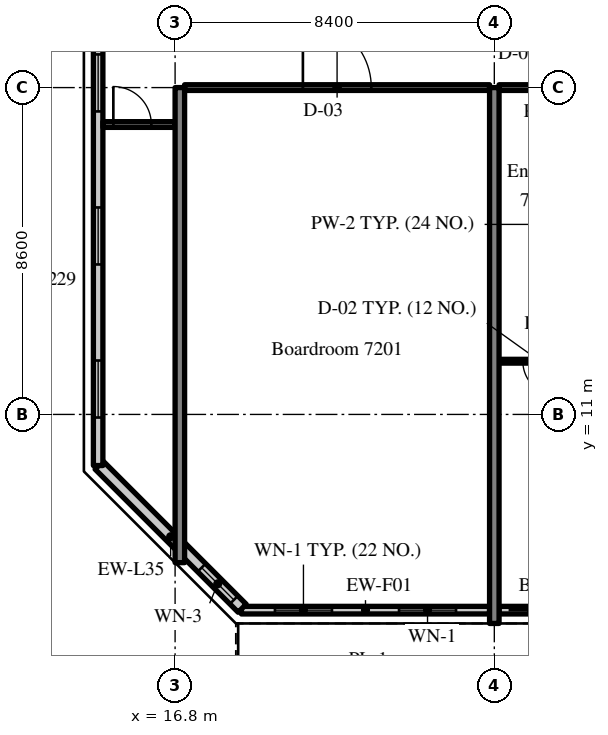
"""IFC4 building model, lengths in metres.
Left out: names, types, materials, properties, quantities, classifications, styles, units other than length and angle.
Written with IfcOpenShell. Run it as: python <this file> out.ifc"""

import sys

from ifc_helpers import new_model, si_unit, direction, frame, frame_2d, origin, place, context, subcontext, project, spatial, rectangle, extrude, source, transform, mapped, element, fill, save


model = new_model("IFC4")
c1 = context("Model", 3, precision=1e-05, world=origin(), true_north=direction((0.0, 1.0)))
c2 = subcontext(c1, "Body", "Model", "MODEL_VIEW")
j1 = project(units=[si_unit("LENGTHUNIT", "METRE"), si_unit("PLANEANGLEUNIT", "RADIAN")], contexts=[c1])
p1 = place(None, origin())
s1 = spatial("IfcSite", under=j1, at=p1, CompositionType="ELEMENT")
p2 = place(p1, origin())
s2 = spatial("IfcBuilding", under=s1, at=p2, CompositionType="ELEMENT")
p3 = place(p2, frame((0.0, 0.0, 301.7)))
s3 = spatial("IfcBuildingStorey", under=s2, at=p3, CompositionType="ELEMENT", Elevation=301.7)
m1 = source(origin(), c2, "Body", "SweptSolid", [
    extrude(rectangle(XDim=12.5, YDim=0.25, at=frame_2d((6.25, 0.0))), origin(), (0.0, 0.0, 1.0), 3.72),
])
p4 = place(p3, frame((16.925, 7.1, 0.0), z_axis=(0.0, 0.0, 1.0), x_axis=(0.0, 1.0, 0.0)))
e1 = element("IfcWall", 1, at=p4, inside=s3, PredefinedType="SHEAR", context=c2, shape_type="MappedRepresentation", body=[
    mapped(m1, transform((0.0, 0.0, 0.0), scale=1.0)),
])
m2 = source(origin(), c2, "Body", "SweptSolid", [
    extrude(rectangle(XDim=14.1, YDim=0.25, at=frame_2d((7.05, 0.0))), origin(), (0.0, 0.0, 1.0), 3.72),
])
p5 = place(p3, frame((25.2, 5.5, 0.0), z_axis=(0.0, 0.0, 1.0), x_axis=(0.0, 1.0, 0.0)))
e2 = element("IfcWall", 2, at=p5, inside=s3, PredefinedType="SHEAR", context=c2, shape_type="MappedRepresentation", body=[
    mapped(m2, transform((0.0, 0.0, 0.0), scale=1.0)),
])
m3 = source(origin(), c2, "Body", "SweptSolid", [
    extrude(rectangle(XDim=6.53, YDim=0.2, at=frame_2d((3.265, 0.0))), origin(), (0.0, 0.0, 1.0), 3.17),
])
p6 = place(p3, frame((18.545, 5.85, 0.0), z_axis=(0.0, 0.0, 1.0), x_axis=(1.0, 0.0, 0.0)))
e3 = element("IfcWall", 3, at=p6, inside=s3, PredefinedType="SOLIDWALL", context=c2, shape_type="MappedRepresentation", body=[
    mapped(m3, transform((0.0, 0.0, 0.0), scale=1.0)),
])
m4 = source(origin(), c2, "Body", "SweptSolid", [
    extrude(rectangle(XDim=1.5, YDim=1.5, at=frame_2d((0.75, 0.75))), frame((0.0, 0.11, 0.0), z_axis=(0.0, -1.0, 0.0), x_axis=(1.0, 0.0, 0.0)), (0.0, 0.0, 1.0), 0.22),
])
p7 = place(p6, frame((0.883, 0.0, 0.9)))
e4 = element("IfcOpeningElement", 4, at=p7, cuts=e3, PredefinedType="OPENING", context=c2, shape_type="MappedRepresentation", body=[
    mapped(m4, transform((0.0, 0.0, 0.0), scale=1.0)),
])
p8 = place(p6, frame((4.147, 0.0, 0.9)))
e5 = element("IfcOpeningElement", 5, at=p8, cuts=e3, PredefinedType="OPENING", context=c2, shape_type="MappedRepresentation", body=[
    mapped(m4, transform((0.0, 0.0, 0.0), scale=1.0)),
])
m5 = source(origin(), c2, "Body", "SweptSolid", [
    extrude(rectangle(XDim=8.15, YDim=0.2, at=frame_2d((4.075, 0.0))), origin(), (0.0, 0.0, 1.0), 3.17),
])
p9 = place(p3, frame((25.325, 5.85, 0.0), z_axis=(0.0, 0.0, 1.0), x_axis=(1.0, 0.0, 0.0)))
e6 = element("IfcWall", 6, at=p9, inside=s3, PredefinedType="SOLIDWALL", context=c2, shape_type="MappedRepresentation", body=[
    mapped(m5, transform((0.0, 0.0, 0.0), scale=1.0)),
])
m6 = source(origin(), c2, "Body", "SweptSolid", [
    extrude(rectangle(XDim=1.2, YDim=2.4, at=frame_2d((0.6, 1.2))), frame((0.0, 0.11, 0.0), z_axis=(0.0, -1.0, 0.0), x_axis=(1.0, 0.0, 0.0)), (0.0, 0.0, 1.0), 0.22),
])
p10 = place(p9, frame((0.25, 0.0, 0.0)))
e7 = element("IfcOpeningElement", 7, at=p10, cuts=e6, PredefinedType="OPENING", context=c2, shape_type="MappedRepresentation", body=[
    mapped(m6, transform((0.0, 0.0, 0.0), scale=1.0)),
])
p11 = place(p9, frame((2.325, 0.0, 0.9)))
e8 = element("IfcOpeningElement", 8, at=p11, cuts=e6, PredefinedType="OPENING", context=c2, shape_type="MappedRepresentation", body=[
    mapped(m4, transform((0.0, 0.0, 0.0), scale=1.0)),
])
p12 = place(p9, frame((4.325, 0.0, 0.0)))
e9 = element("IfcOpeningElement", 9, at=p12, cuts=e6, PredefinedType="OPENING", context=c2, shape_type="MappedRepresentation", body=[
    mapped(m6, transform((0.0, 0.0, 0.0), scale=1.0)),
])
p13 = place(p9, frame((6.4, 0.0, 0.9)))
e10 = element("IfcOpeningElement", 10, at=p13, cuts=e6, PredefinedType="OPENING", context=c2, shape_type="MappedRepresentation", body=[
    mapped(m4, transform((0.0, 0.0, 0.0), scale=1.0)),
])
m7 = source(origin(), c2, "Body", "SweptSolid", [
    extrude(rectangle(XDim=5.326, YDim=0.3, at=frame_2d((2.663, 0.0))), origin(), (0.0, 0.0, 1.0), 3.72),
])
p14 = place(p3, frame((14.8, 9.666, 0.0), z_axis=(0.0, 0.0, 1.0), x_axis=(0.707083859269, -0.707129702361, 0.0)))
e11 = element("IfcWall", 11, at=p14, inside=s3, PredefinedType="SOLIDWALL", context=c2, shape_type="MappedRepresentation", body=[
    mapped(m7, transform((0.0, 0.0, 0.0), scale=1.0)),
])
m8 = source(origin(), c2, "Body", "SweptSolid", [
    extrude(rectangle(XDim=1.2, YDim=1.5, at=frame_2d((0.6, 0.75))), frame((0.0, 0.16, 0.0), z_axis=(0.0, -1.0, 0.0), x_axis=(1.0, 0.0, 0.0)), (0.0, 0.0, 1.0), 0.32),
])
p15 = place(p14, frame((3.815, 0.0, 0.9)))
e12 = element("IfcOpeningElement", 12, at=p15, cuts=e11, PredefinedType="OPENING", context=c2, shape_type="MappedRepresentation", body=[
    mapped(m8, transform((0.0, 0.0, 0.0), scale=1.0)),
])
m9 = source(origin(), c2, "Body", "SweptSolid", [
    extrude(rectangle(XDim=28.189, YDim=0.25, at=frame_2d((14.095, 0.0))), origin(), (0.0, 0.0, 1.0), 3.72),
])
p16 = place(p3, frame((14.775, 37.845, 0.0), z_axis=(0.0, 0.0, 1.0), x_axis=(0.0, -1.0, 0.0)))
e13 = element("IfcWall", 13, at=p16, inside=s3, PredefinedType="SOLIDWALL", context=c2, shape_type="MappedRepresentation", body=[
    mapped(m9, transform((0.0, 0.0, 0.0), scale=1.0)),
])
m10 = source(origin(), c2, "Body", "SweptSolid", [
    extrude(rectangle(XDim=1.5, YDim=1.5, at=frame_2d((0.75, 0.75))), frame((0.0, 0.135, 0.0), z_axis=(0.0, -1.0, 0.0), x_axis=(1.0, 0.0, 0.0)), (0.0, 0.0, 1.0), 0.27),
])
p17 = place(p16, frame((1.263, 0.0, 0.9)))
e14 = element("IfcOpeningElement", 14, at=p17, cuts=e13, PredefinedType="OPENING", context=c2, shape_type="MappedRepresentation", body=[
    mapped(m10, transform((0.0, 0.0, 0.0), scale=1.0)),
])
p18 = place(p16, frame((5.291, 0.0, 0.9)))
e15 = element("IfcOpeningElement", 15, at=p18, cuts=e13, PredefinedType="OPENING", context=c2, shape_type="MappedRepresentation", body=[
    mapped(m10, transform((0.0, 0.0, 0.0), scale=1.0)),
])
p19 = place(p16, frame((9.318, 0.0, 0.9)))
e16 = element("IfcOpeningElement", 16, at=p19, cuts=e13, PredefinedType="OPENING", context=c2, shape_type="MappedRepresentation", body=[
    mapped(m10, transform((0.0, 0.0, 0.0), scale=1.0)),
])
p20 = place(p16, frame((13.345, 0.0, 0.9)))
e17 = element("IfcOpeningElement", 17, at=p20, cuts=e13, PredefinedType="OPENING", context=c2, shape_type="MappedRepresentation", body=[
    mapped(m10, transform((0.0, 0.0, 0.0), scale=1.0)),
])
p21 = place(p16, frame((17.372, 0.0, 0.9)))
e18 = element("IfcOpeningElement", 18, at=p21, cuts=e13, PredefinedType="OPENING", context=c2, shape_type="MappedRepresentation", body=[
    mapped(m10, transform((0.0, 0.0, 0.0), scale=1.0)),
])
p22 = place(p16, frame((21.399, 0.0, 0.9)))
e19 = element("IfcOpeningElement", 19, at=p22, cuts=e13, PredefinedType="OPENING", context=c2, shape_type="MappedRepresentation", body=[
    mapped(m10, transform((0.0, 0.0, 0.0), scale=1.0)),
])
p23 = place(p16, frame((25.426, 0.0, 0.9)))
e20 = element("IfcOpeningElement", 20, at=p23, cuts=e13, PredefinedType="OPENING", context=c2, shape_type="MappedRepresentation", body=[
    mapped(m10, transform((0.0, 0.0, 0.0), scale=1.0)),
])
m11 = source(origin(), c2, "Body", "SweptSolid", [
    extrude(rectangle(XDim=8.025, YDim=0.15, at=frame_2d((4.012, 0.0))), origin(), (0.0, 0.0, 1.0), 3.02),
])
p24 = place(p3, frame((17.05, 19.6, 0.0), z_axis=(0.0, 0.0, 1.0), x_axis=(1.0, 0.0, 0.0)))
e21 = element("IfcWall", 21, at=p24, inside=s3, PredefinedType="PARTITIONING", context=c2, shape_type="MappedRepresentation", body=[
    mapped(m11, transform((0.0, 0.0, 0.0), scale=1.0)),
])
m12 = source(origin(), c2, "Body", "SweptSolid", [
    extrude(rectangle(XDim=1.8, YDim=2.1, at=frame_2d((0.9, 1.05))), frame((0.0, 0.085, 0.0), z_axis=(0.0, -1.0, 0.0), x_axis=(1.0, 0.0, 0.0)), (0.0, 0.0, 1.0), 0.17),
])
p25 = place(p24, frame((3.113, 0.0, 0.0)))
e22 = element("IfcOpeningElement", 22, at=p25, cuts=e21, PredefinedType="OPENING", context=c2, shape_type="MappedRepresentation", body=[
    mapped(m12, transform((0.0, 0.0, 0.0), scale=1.0)),
])
m13 = source(origin(), c2, "Body", "SweptSolid", [
    extrude(rectangle(XDim=2.15, YDim=0.1, at=frame_2d((1.075, 0.0))), origin(), (0.0, 0.0, 1.0), 3.72),
])
p26 = place(p3, frame((25.325, 12.4, 0.0), z_axis=(0.0, 0.0, 1.0), x_axis=(1.0, 0.0, 0.0)))
e23 = element("IfcWall", 23, at=p26, inside=s3, PredefinedType="PARTITIONING", context=c2, shape_type="MappedRepresentation", body=[
    mapped(m13, transform((0.0, 0.0, 0.0), scale=1.0)),
])
m14 = source(origin(), c2, "Body", "SweptSolid", [
    extrude(rectangle(XDim=0.9, YDim=2.1, at=frame_2d((0.45, 1.05))), frame((0.0, 0.06, 0.0), z_axis=(0.0, -1.0, 0.0), x_axis=(1.0, 0.0, 0.0)), (0.0, 0.0, 1.0), 0.12),
])
p27 = place(p26, frame((0.625, 0.0, 0.0)))
e24 = element("IfcOpeningElement", 24, at=p27, cuts=e23, PredefinedType="OPENING", context=c2, shape_type="MappedRepresentation", body=[
    mapped(m14, transform((0.0, 0.0, 0.0), scale=1.0)),
])
m15 = source(origin(), c2, "Body", "SweptSolid", [
    extrude(rectangle(XDim=4.0, YDim=0.15, at=frame_2d((2.0, 0.0))), origin(), (0.0, 0.0, 1.0), 3.02),
])
p28 = place(p3, frame((25.325, 19.6, 0.0), z_axis=(0.0, 0.0, 1.0), x_axis=(1.0, 0.0, 0.0)))
e25 = element("IfcWall", 25, at=p28, inside=s3, PredefinedType="PARTITIONING", context=c2, shape_type="MappedRepresentation", body=[
    mapped(m15, transform((0.0, 0.0, 0.0), scale=1.0)),
])
m16 = source(origin(), c2, "Body", "SweptSolid", [
    extrude(rectangle(XDim=1.0, YDim=2.1, at=frame_2d((0.5, 1.05))), frame((0.0, 0.085, 0.0), z_axis=(0.0, -1.0, 0.0), x_axis=(1.0, 0.0, 0.0)), (0.0, 0.0, 1.0), 0.17),
])
p29 = place(p28, frame((2.6, 0.0, 0.0)))
e26 = element("IfcOpeningElement", 26, at=p29, cuts=e25, PredefinedType="OPENING", context=c2, shape_type="MappedRepresentation", body=[
    mapped(m16, transform((0.0, 0.0, 0.0), scale=1.0)),
])
m17 = source(origin(), c2, "Body", "SweptSolid", [
    extrude(rectangle(XDim=1.9, YDim=0.15, at=frame_2d((0.95, 0.0))), origin(), (0.0, 0.0, 1.0), 3.02),
])
p30 = place(p3, frame((14.9, 18.628, 0.0), z_axis=(0.0, 0.0, 1.0), x_axis=(1.0, 0.0, 0.0)))
e27 = element("IfcWall", 27, at=p30, inside=s3, PredefinedType="PARTITIONING", context=c2, shape_type="MappedRepresentation", body=[
    mapped(m17, transform((0.0, 0.0, 0.0), scale=1.0)),
])
p31 = place(p30, frame((0.275, 0.0, 0.0)))
e28 = element("IfcOpeningElement", 28, at=p31, cuts=e27, PredefinedType="OPENING", context=c2, shape_type="MappedRepresentation", body=[
    mapped(m16, transform((0.0, 0.0, 0.0), scale=1.0)),
])
m18 = source(origin(), c2, "Body", "SweptSolid", [
    extrude(rectangle(XDim=1.5, YDim=1.5, at=frame_2d((0.75, 0.75))), frame((0.0, 0.03, 0.0), z_axis=(0.0, -1.0, 0.0), x_axis=(1.0, 0.0, 0.0)), (0.0, 0.0, 1.0), 0.06),
])
p32 = place(p7, origin())
e29 = element("IfcWindow", 29, at=p32, inside=s3, PartitioningType="SINGLE_PANEL", PredefinedType="WINDOW", context=c2, shape_type="MappedRepresentation", body=[
    mapped(m18, transform((0.0, 0.0, 0.0), scale=1.0)),
])
fill(e4, e29)
p33 = place(p8, origin())
e30 = element("IfcWindow", 30, at=p33, inside=s3, PartitioningType="SINGLE_PANEL", PredefinedType="WINDOW", context=c2, shape_type="MappedRepresentation", body=[
    mapped(m18, transform((0.0, 0.0, 0.0), scale=1.0)),
])
fill(e5, e30)
m19 = source(origin(), c2, "Body", "SweptSolid", [
    extrude(rectangle(XDim=1.2, YDim=2.4, at=frame_2d((0.6, 1.2))), frame((0.0, 0.025, 0.0), z_axis=(0.0, -1.0, 0.0), x_axis=(1.0, 0.0, 0.0)), (0.0, 0.0, 1.0), 0.05),
])
p34 = place(p10, origin())
e31 = element("IfcDoor", 31, at=p34, inside=s3, OperationType="SLIDING_TO_LEFT", PredefinedType="DOOR", context=c2, shape_type="MappedRepresentation", body=[
    mapped(m19, transform((0.0, 0.0, 0.0), scale=1.0)),
])
fill(e7, e31)
m20 = source(origin(), c2, "Body", "SweptSolid", [
    extrude(rectangle(XDim=1.2, YDim=1.5, at=frame_2d((0.6, 0.75))), frame((0.0, 0.03, 0.0), z_axis=(0.0, -1.0, 0.0), x_axis=(1.0, 0.0, 0.0)), (0.0, 0.0, 1.0), 0.06),
])
p35 = place(p15, origin())
e32 = element("IfcWindow", 32, at=p35, inside=s3, PartitioningType="SINGLE_PANEL", PredefinedType="WINDOW", context=c2, shape_type="MappedRepresentation", body=[
    mapped(m20, transform((0.0, 0.0, 0.0), scale=1.0)),
])
fill(e12, e32)
p36 = place(p21, origin())
e33 = element("IfcWindow", 33, at=p36, inside=s3, PartitioningType="SINGLE_PANEL", PredefinedType="WINDOW", context=c2, shape_type="MappedRepresentation", body=[
    mapped(m18, transform((0.0, 0.0, 0.0), scale=1.0)),
])
fill(e18, e33)
p37 = place(p22, origin())
e34 = element("IfcWindow", 34, at=p37, inside=s3, PartitioningType="SINGLE_PANEL", PredefinedType="WINDOW", context=c2, shape_type="MappedRepresentation", body=[
    mapped(m18, transform((0.0, 0.0, 0.0), scale=1.0)),
])
fill(e19, e34)
p38 = place(p23, origin())
e35 = element("IfcWindow", 35, at=p38, inside=s3, PartitioningType="SINGLE_PANEL", PredefinedType="WINDOW", context=c2, shape_type="MappedRepresentation", body=[
    mapped(m18, transform((0.0, 0.0, 0.0), scale=1.0)),
])
fill(e20, e35)
m21 = source(origin(), c2, "Body", "SweptSolid", [
    extrude(rectangle(XDim=1.8, YDim=2.1, at=frame_2d((0.9, 1.05))), frame((0.0, 0.025, 0.0), z_axis=(0.0, -1.0, 0.0), x_axis=(1.0, 0.0, 0.0)), (0.0, 0.0, 1.0), 0.05),
])
p39 = place(p25, origin())
e36 = element("IfcDoor", 36, at=p39, inside=s3, OperationType="DOUBLE_DOOR_SINGLE_SWING", PredefinedType="DOOR", context=c2, shape_type="MappedRepresentation", body=[
    mapped(m21, transform((0.0, 0.0, 0.0), scale=1.0)),
])
fill(e22, e36)
m22 = source(origin(), c2, "Body", "SweptSolid", [
    extrude(rectangle(XDim=0.9, YDim=2.1, at=frame_2d((0.45, 1.05))), frame((0.0, 0.025, 0.0), z_axis=(0.0, -1.0, 0.0), x_axis=(1.0, 0.0, 0.0)), (0.0, 0.0, 1.0), 0.05),
])
p40 = place(p27, origin())
e37 = element("IfcDoor", 37, at=p40, inside=s3, OperationType="SINGLE_SWING_RIGHT", PredefinedType="DOOR", context=c2, shape_type="MappedRepresentation", body=[
    mapped(m22, transform((0.0, 0.0, 0.0), scale=1.0)),
])
fill(e24, e37)
m23 = source(origin(), c2, "Body", "SweptSolid", [
    extrude(rectangle(XDim=1.0, YDim=2.1, at=frame_2d((0.5, 1.05))), frame((0.0, 0.025, 0.0), z_axis=(0.0, -1.0, 0.0), x_axis=(1.0, 0.0, 0.0)), (0.0, 0.0, 1.0), 0.05),
])
p41 = place(p31, origin())
e38 = element("IfcDoor", 38, at=p41, inside=s3, OperationType="SINGLE_SWING_LEFT", PredefinedType="DOOR", context=c2, shape_type="MappedRepresentation", body=[
    mapped(m23, transform((0.0, 0.0, 0.0), scale=1.0)),
])
fill(e28, e38)
save(model, sys.argv[1])
